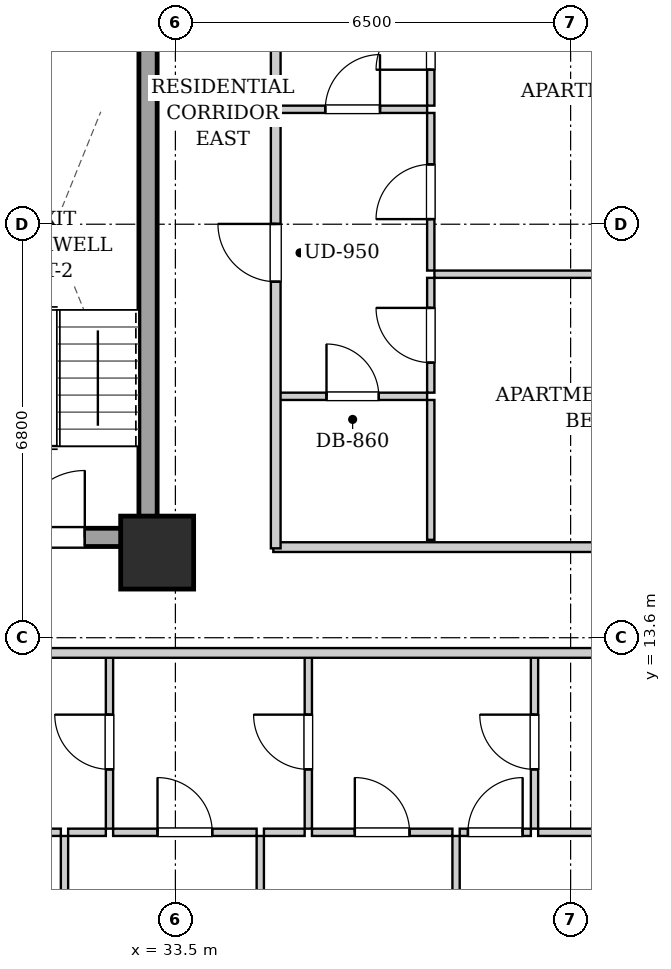
"""IFC4 building model, lengths in metres.
Left out: names, types, materials, properties, quantities, classifications, styles, units other than length and angle.
Written with IfcOpenShell. Run it as: python <this file> out.ifc"""

import sys

from ifc_helpers import new_model, si_unit, direction, frame, frame_2d, origin, origin_2d, place, context, subcontext, project, spatial, rectangle, extrude, element, fill, save


model = new_model("IFC4")
c1 = context("Model", 3, precision=1e-05, world=origin(), true_north=direction((0.0, 1.0)))
c2 = subcontext(c1, "Body", "Model", "MODEL_VIEW")
j1 = project(units=[si_unit("LENGTHUNIT", "METRE"), si_unit("PLANEANGLEUNIT", "RADIAN")], contexts=[c1])
p1 = place(None, origin())
s1 = spatial("IfcSite", under=j1, at=p1, CompositionType="ELEMENT")
p2 = place(p1, origin())
s2 = spatial("IfcBuilding", under=s1, at=p2, CompositionType="ELEMENT")
p3 = place(p2, frame((0.0, 0.0, 67.4)))
s3 = spatial("IfcBuildingStorey", under=s2, at=p3, CompositionType="ELEMENT", Elevation=67.4)
p4 = place(p3, frame((33.2, 15.0, 0.0), z_axis=(0.0, 0.0, 1.0), x_axis=(1.0, 0.0, 0.0)))
e1 = element("IfcColumn", 1, at=p4, inside=s3, PredefinedType="COLUMN", context=c2, shape_type="SweptSolid", body=[
    extrude(rectangle(XDim=1.2, YDim=1.2, at=origin_2d()), origin(), (0.0, 0.0, 1.0), 3.2),
])
p5 = place(p3, frame((33.05, 15.1, 0.0), z_axis=(0.0, 0.0, 1.0), x_axis=(0.0, 1.0, 0.0)))
e2 = element("IfcWall", 2, at=p5, inside=s3, PredefinedType="SHEAR", context=c2, shape_type="SweptSolid", body=[
    extrude(rectangle(XDim=9.0, YDim=0.3, at=frame_2d((4.5, 0.0))), origin(), (0.0, 0.0, 1.0), 2.88),
])
p6 = place(p3, frame((30.05, 15.25, 0.0), z_axis=(0.0, 0.0, 1.0), x_axis=(1.0, 0.0, 0.0)))
e3 = element("IfcWall", 3, at=p6, inside=s3, PredefinedType="SHEAR", context=c2, shape_type="SweptSolid", body=[
    extrude(rectangle(XDim=2.85, YDim=0.3, at=frame_2d((1.425, 0.0))), origin(), (0.0, 0.0, 1.0), 2.88),
])
p7 = place(p6, frame((0.86, 0.0, 0.0)))
e4 = element("IfcOpeningElement", 4, at=p7, cuts=e3, PredefinedType="OPENING", context=c2, shape_type="SweptSolid", body=[
    extrude(rectangle(XDim=1.1, YDim=2.05, at=frame_2d((0.55, 1.025))), frame((0.0, 0.16, 0.0), z_axis=(0.0, -1.0, 0.0), x_axis=(1.0, 0.0, 0.0)), (0.0, 0.0, 1.0), 0.32),
])
p8 = place(p3, frame((35.11, 15.09, 0.0), z_axis=(0.0, 0.0, 1.0), x_axis=(1.0, 0.0, 0.0)))
e5 = element("IfcWall", 5, at=p8, inside=s3, PredefinedType="PARTITIONING", context=c2, shape_type="SweptSolid", body=[
    extrude(rectangle(XDim=11.11, YDim=0.16, at=frame_2d((5.555, 0.0))), origin(), (0.0, 0.0, 1.0), 2.172),
])
p9 = place(p3, frame((32.416, 10.46, 0.0), z_axis=(0.0, 0.0, 1.0), x_axis=(0.0, 1.0, 0.0)))
e6 = element("IfcWall", 6, at=p9, inside=s3, PredefinedType="PARTITIONING", context=c2, shape_type="SweptSolid", body=[
    extrude(rectangle(XDim=2.85, YDim=0.12, at=frame_2d((1.425, 0.0))), origin(), (0.0, 0.0, 1.0), 2.88),
])
p10 = place(p9, frame((0.975, 0.0, 0.0)))
e7 = element("IfcOpeningElement", 7, at=p10, cuts=e6, PredefinedType="OPENING", context=c2, shape_type="SweptSolid", body=[
    extrude(rectangle(XDim=0.9, YDim=2.05, at=frame_2d((0.45, 1.025))), frame((0.0, 0.07, 0.0), z_axis=(0.0, -1.0, 0.0), x_axis=(1.0, 0.0, 0.0)), (0.0, 0.0, 1.0), 0.14),
])
p11 = place(p3, frame((29.206, 10.4, 0.0), z_axis=(0.0, 0.0, 1.0), x_axis=(1.0, 0.0, 0.0)))
e8 = element("IfcWall", 8, at=p11, inside=s3, PredefinedType="PARTITIONING", context=c2, shape_type="SweptSolid", body=[
    extrude(rectangle(XDim=2.41, YDim=0.12, at=frame_2d((1.205, 0.0))), origin(), (0.0, 0.0, 1.0), 2.88),
])
p12 = place(p11, frame((0.755, 0.0, 0.0)))
e9 = element("IfcOpeningElement", 9, at=p12, cuts=e8, PredefinedType="OPENING", context=c2, shape_type="SweptSolid", body=[
    extrude(rectangle(XDim=0.9, YDim=2.05, at=frame_2d((0.45, 1.025))), frame((0.0, 0.07, 0.0), z_axis=(0.0, -1.0, 0.0), x_axis=(1.0, 0.0, 0.0)), (0.0, 0.0, 1.0), 0.14),
])
p13 = place(p3, frame((31.736, 10.4, 0.0), z_axis=(0.0, 0.0, 1.0), x_axis=(1.0, 0.0, 0.0)))
e10 = element("IfcWall", 10, at=p13, inside=s3, PredefinedType="PARTITIONING", context=c2, shape_type="SweptSolid", body=[
    extrude(rectangle(XDim=0.62, YDim=0.12, at=frame_2d((0.31, 0.0))), origin(), (0.0, 0.0, 1.0), 2.88),
])
p14 = place(p3, frame((35.686, 10.46, 0.0), z_axis=(0.0, 0.0, 1.0), x_axis=(0.0, 1.0, 0.0)))
e11 = element("IfcWall", 11, at=p14, inside=s3, PredefinedType="PARTITIONING", context=c2, shape_type="SweptSolid", body=[
    extrude(rectangle(XDim=2.85, YDim=0.12, at=frame_2d((1.425, 0.0))), origin(), (0.0, 0.0, 1.0), 2.88),
])
p15 = place(p14, frame((0.975, 0.0, 0.0)))
e12 = element("IfcOpeningElement", 12, at=p15, cuts=e11, PredefinedType="OPENING", context=c2, shape_type="SweptSolid", body=[
    extrude(rectangle(XDim=0.9, YDim=2.05, at=frame_2d((0.45, 1.025))), frame((0.0, 0.07, 0.0), z_axis=(0.0, -1.0, 0.0), x_axis=(1.0, 0.0, 0.0)), (0.0, 0.0, 1.0), 0.14),
])
p16 = place(p3, frame((32.476, 10.4, 0.0), z_axis=(0.0, 0.0, 1.0), x_axis=(1.0, 0.0, 0.0)))
e13 = element("IfcWall", 13, at=p16, inside=s3, PredefinedType="PARTITIONING", context=c2, shape_type="SweptSolid", body=[
    extrude(rectangle(XDim=2.36, YDim=0.12, at=frame_2d((1.18, 0.0))), origin(), (0.0, 0.0, 1.0), 2.88),
])
p17 = place(p16, frame((0.73, 0.0, 0.0)))
e14 = element("IfcOpeningElement", 14, at=p17, cuts=e13, PredefinedType="OPENING", context=c2, shape_type="SweptSolid", body=[
    extrude(rectangle(XDim=0.9, YDim=2.05, at=frame_2d((0.45, 1.025))), frame((0.0, 0.07, 0.0), z_axis=(0.0, -1.0, 0.0), x_axis=(1.0, 0.0, 0.0)), (0.0, 0.0, 1.0), 0.14),
])
p18 = place(p3, frame((34.956, 10.4, 0.0), z_axis=(0.0, 0.0, 1.0), x_axis=(1.0, 0.0, 0.0)))
e15 = element("IfcWall", 15, at=p18, inside=s3, PredefinedType="PARTITIONING", context=c2, shape_type="SweptSolid", body=[
    extrude(rectangle(XDim=0.67, YDim=0.12, at=frame_2d((0.335, 0.0))), origin(), (0.0, 0.0, 1.0), 2.88),
])
p19 = place(p3, frame((39.406, 10.46, 0.0), z_axis=(0.0, 0.0, 1.0), x_axis=(0.0, 1.0, 0.0)))
e16 = element("IfcWall", 16, at=p19, inside=s3, PredefinedType="PARTITIONING", context=c2, shape_type="SweptSolid", body=[
    extrude(rectangle(XDim=2.85, YDim=0.12, at=frame_2d((1.425, 0.0))), origin(), (0.0, 0.0, 1.0), 2.88),
])
p20 = place(p19, frame((0.975, 0.0, 0.0)))
e17 = element("IfcOpeningElement", 17, at=p20, cuts=e16, PredefinedType="OPENING", context=c2, shape_type="SweptSolid", body=[
    extrude(rectangle(XDim=0.9, YDim=2.05, at=frame_2d((0.45, 1.025))), frame((0.0, 0.07, 0.0), z_axis=(0.0, -1.0, 0.0), x_axis=(1.0, 0.0, 0.0)), (0.0, 0.0, 1.0), 0.14),
])
p21 = place(p3, frame((35.746, 10.4, 0.0), z_axis=(0.0, 0.0, 1.0), x_axis=(1.0, 0.0, 0.0)))
e18 = element("IfcWall", 18, at=p21, inside=s3, PredefinedType="PARTITIONING", context=c2, shape_type="SweptSolid", body=[
    extrude(rectangle(XDim=2.31, YDim=0.12, at=frame_2d((1.155, 0.0))), origin(), (0.0, 0.0, 1.0), 2.88),
])
p22 = place(p21, frame((0.705, 0.0, 0.0)))
e19 = element("IfcOpeningElement", 19, at=p22, cuts=e18, PredefinedType="OPENING", context=c2, shape_type="SweptSolid", body=[
    extrude(rectangle(XDim=0.9, YDim=2.05, at=frame_2d((0.45, 1.025))), frame((0.0, 0.07, 0.0), z_axis=(0.0, -1.0, 0.0), x_axis=(1.0, 0.0, 0.0)), (0.0, 0.0, 1.0), 0.14),
])
p23 = place(p3, frame((38.176, 10.4, 0.0), z_axis=(0.0, 0.0, 1.0), x_axis=(1.0, 0.0, 0.0)))
e20 = element("IfcWall", 20, at=p23, inside=s3, PredefinedType="PARTITIONING", context=c2, shape_type="SweptSolid", body=[
    extrude(rectangle(XDim=1.17, YDim=0.12, at=frame_2d((0.585, 0.0))), origin(), (0.0, 0.0, 1.0), 2.88),
])
p24 = place(p23, frame((0.135, 0.0, 0.0)))
e21 = element("IfcOpeningElement", 21, at=p24, cuts=e20, PredefinedType="OPENING", context=c2, shape_type="SweptSolid", body=[
    extrude(rectangle(XDim=0.9, YDim=2.05, at=frame_2d((0.45, 1.025))), frame((0.0, 0.07, 0.0), z_axis=(0.0, -1.0, 0.0), x_axis=(1.0, 0.0, 0.0)), (0.0, 0.0, 1.0), 0.14),
])
p25 = place(p3, frame((39.466, 10.4, 0.0), z_axis=(0.0, 0.0, 1.0), x_axis=(1.0, 0.0, 0.0)))
e22 = element("IfcWall", 22, at=p25, inside=s3, PredefinedType="PARTITIONING", context=c2, shape_type="SweptSolid", body=[
    extrude(rectangle(XDim=4.024, YDim=0.12, at=frame_2d((2.012, 0.0))), origin(), (0.0, 0.0, 1.0), 2.88),
])
p26 = place(p25, frame((1.562, 0.0, 0.0)))
e23 = element("IfcOpeningElement", 23, at=p26, cuts=e22, PredefinedType="OPENING", context=c2, shape_type="SweptSolid", body=[
    extrude(rectangle(XDim=0.9, YDim=2.05, at=frame_2d((0.45, 1.025))), frame((0.0, 0.07, 0.0), z_axis=(0.0, -1.0, 0.0), x_axis=(1.0, 0.0, 0.0)), (0.0, 0.0, 1.0), 0.14),
])
p27 = place(p3, frame((31.676, 0.28, 0.0), z_axis=(0.0, 0.0, 1.0), x_axis=(0.0, 1.0, 0.0)))
e24 = element("IfcWall", 24, at=p27, inside=s3, PredefinedType="PARTITIONING", context=c2, shape_type="SweptSolid", body=[
    extrude(rectangle(XDim=10.06, YDim=0.12, at=frame_2d((5.03, 0.0))), origin(), (0.0, 0.0, 1.0), 2.88),
])
p28 = place(p27, frame((4.565, 0.0, 0.0)))
e25 = element("IfcOpeningElement", 25, at=p28, cuts=e24, PredefinedType="OPENING", context=c2, shape_type="SweptSolid", body=[
    extrude(rectangle(XDim=0.9, YDim=2.05, at=frame_2d((0.45, 1.025))), frame((0.0, 0.07, 0.0), z_axis=(0.0, -1.0, 0.0), x_axis=(1.0, 0.0, 0.0)), (0.0, 0.0, 1.0), 0.14),
])
p29 = place(p3, frame((34.896, 0.28, 0.0), z_axis=(0.0, 0.0, 1.0), x_axis=(0.0, 1.0, 0.0)))
e26 = element("IfcWall", 26, at=p29, inside=s3, PredefinedType="PARTITIONING", context=c2, shape_type="SweptSolid", body=[
    extrude(rectangle(XDim=10.06, YDim=0.12, at=frame_2d((5.03, 0.0))), origin(), (0.0, 0.0, 1.0), 2.88),
])
p30 = place(p29, frame((4.565, 0.0, 0.0)))
e27 = element("IfcOpeningElement", 27, at=p30, cuts=e26, PredefinedType="OPENING", context=c2, shape_type="SweptSolid", body=[
    extrude(rectangle(XDim=0.9, YDim=2.05, at=frame_2d((0.45, 1.025))), frame((0.0, 0.07, 0.0), z_axis=(0.0, -1.0, 0.0), x_axis=(1.0, 0.0, 0.0)), (0.0, 0.0, 1.0), 0.14),
])
p31 = place(p3, frame((38.116, 0.28, 0.0), z_axis=(0.0, 0.0, 1.0), x_axis=(0.0, 1.0, 0.0)))
e28 = element("IfcWall", 28, at=p31, inside=s3, PredefinedType="PARTITIONING", context=c2, shape_type="SweptSolid", body=[
    extrude(rectangle(XDim=10.06, YDim=0.12, at=frame_2d((5.03, 0.0))), origin(), (0.0, 0.0, 1.0), 2.88),
])
p32 = place(p31, frame((4.565, 0.0, 0.0)))
e29 = element("IfcOpeningElement", 29, at=p32, cuts=e28, PredefinedType="OPENING", context=c2, shape_type="SweptSolid", body=[
    extrude(rectangle(XDim=0.9, YDim=2.05, at=frame_2d((0.45, 1.025))), frame((0.0, 0.07, 0.0), z_axis=(0.0, -1.0, 0.0), x_axis=(1.0, 0.0, 0.0)), (0.0, 0.0, 1.0), 0.14),
])
p33 = place(p3, frame((35.19, 22.29, 0.0), z_axis=(0.0, 0.0, 1.0), x_axis=(1.0, 0.0, 0.0)))
e30 = element("IfcWall", 30, at=p33, inside=s3, PredefinedType="PARTITIONING", context=c2, shape_type="SweptSolid", body=[
    extrude(rectangle(XDim=2.45, YDim=0.12, at=frame_2d((1.225, 0.0))), origin(), (0.0, 0.0, 1.0), 2.88),
])
p34 = place(p33, frame((0.775, 0.0, 0.0)))
e31 = element("IfcOpeningElement", 31, at=p34, cuts=e30, PredefinedType="OPENING", context=c2, shape_type="SweptSolid", body=[
    extrude(rectangle(XDim=0.9, YDim=2.05, at=frame_2d((0.45, 1.025))), frame((0.0, 0.07, 0.0), z_axis=(0.0, -1.0, 0.0), x_axis=(1.0, 0.0, 0.0)), (0.0, 0.0, 1.0), 0.14),
])
p35 = place(p3, frame((37.7, 22.35, 0.0), z_axis=(0.0, 0.0, 1.0), x_axis=(0.0, 1.0, 0.0)))
e32 = element("IfcWall", 32, at=p35, inside=s3, PredefinedType="PARTITIONING", context=c2, shape_type="SweptSolid", body=[
    extrude(rectangle(XDim=2.082, YDim=0.12, at=frame_2d((1.041, 0.0))), origin(), (0.0, 0.0, 1.0), 2.88),
])
p36 = place(p35, frame((0.591, 0.0, 0.0)))
e33 = element("IfcOpeningElement", 33, at=p36, cuts=e32, PredefinedType="OPENING", context=c2, shape_type="SweptSolid", body=[
    extrude(rectangle(XDim=0.9, YDim=2.05, at=frame_2d((0.45, 1.025))), frame((0.0, 0.07, 0.0), z_axis=(0.0, -1.0, 0.0), x_axis=(1.0, 0.0, 0.0)), (0.0, 0.0, 1.0), 0.14),
])
p37 = place(p3, frame((35.19, 17.57, 0.0), z_axis=(0.0, 0.0, 1.0), x_axis=(1.0, 0.0, 0.0)))
e34 = element("IfcWall", 34, at=p37, inside=s3, PredefinedType="PARTITIONING", context=c2, shape_type="SweptSolid", body=[
    extrude(rectangle(XDim=2.45, YDim=0.12, at=frame_2d((1.225, 0.0))), origin(), (0.0, 0.0, 1.0), 2.88),
])
p38 = place(p37, frame((0.795, 0.0, 0.0)))
e35 = element("IfcOpeningElement", 35, at=p38, cuts=e34, PredefinedType="OPENING", context=c2, shape_type="SweptSolid", body=[
    extrude(rectangle(XDim=0.86, YDim=2.05, at=frame_2d((0.43, 1.025))), frame((0.0, 0.07, 0.0), z_axis=(0.0, -1.0, 0.0), x_axis=(1.0, 0.0, 0.0)), (0.0, 0.0, 1.0), 0.14),
])
p39 = place(p3, frame((37.7, 15.21, 0.0), z_axis=(0.0, 0.0, 1.0), x_axis=(0.0, 1.0, 0.0)))
e36 = element("IfcWall", 36, at=p39, inside=s3, PredefinedType="PARTITIONING", context=c2, shape_type="SweptSolid", body=[
    extrude(rectangle(XDim=2.3, YDim=0.12, at=frame_2d((1.15, 0.0))), origin(), (0.0, 0.0, 1.0), 2.88),
])
p40 = place(p3, frame((37.7, 17.63, 0.0), z_axis=(0.0, 0.0, 1.0), x_axis=(0.0, 1.0, 0.0)))
e37 = element("IfcWall", 37, at=p40, inside=s3, PredefinedType="PARTITIONING", context=c2, shape_type="SweptSolid", body=[
    extrude(rectangle(XDim=1.888, YDim=0.12, at=frame_2d((0.944, 0.0))), origin(), (0.0, 0.0, 1.0), 2.88),
])
p41 = place(p40, frame((0.494, 0.0, 0.0)))
e38 = element("IfcOpeningElement", 38, at=p41, cuts=e37, PredefinedType="OPENING", context=c2, shape_type="SweptSolid", body=[
    extrude(rectangle(XDim=0.9, YDim=2.05, at=frame_2d((0.45, 1.025))), frame((0.0, 0.07, 0.0), z_axis=(0.0, -1.0, 0.0), x_axis=(1.0, 0.0, 0.0)), (0.0, 0.0, 1.0), 0.14),
])
p42 = place(p3, frame((37.7, 19.638, 0.0), z_axis=(0.0, 0.0, 1.0), x_axis=(0.0, 1.0, 0.0)))
e39 = element("IfcWall", 39, at=p42, inside=s3, PredefinedType="PARTITIONING", context=c2, shape_type="SweptSolid", body=[
    extrude(rectangle(XDim=2.592, YDim=0.12, at=frame_2d((1.296, 0.0))), origin(), (0.0, 0.0, 1.0), 2.88),
])
p43 = place(p42, frame((0.846, 0.0, 0.0)))
e40 = element("IfcOpeningElement", 40, at=p43, cuts=e39, PredefinedType="OPENING", context=c2, shape_type="SweptSolid", body=[
    extrude(rectangle(XDim=0.9, YDim=2.05, at=frame_2d((0.45, 1.025))), frame((0.0, 0.07, 0.0), z_axis=(0.0, -1.0, 0.0), x_axis=(1.0, 0.0, 0.0)), (0.0, 0.0, 1.0), 0.14),
])
p44 = place(p3, frame((37.76, 19.578, 0.0), z_axis=(0.0, 0.0, 1.0), x_axis=(1.0, 0.0, 0.0)))
e41 = element("IfcWall", 41, at=p44, inside=s3, PredefinedType="PARTITIONING", context=c2, shape_type="SweptSolid", body=[
    extrude(rectangle(XDim=6.31, YDim=0.12, at=frame_2d((3.155, 0.0))), origin(), (0.0, 0.0, 1.0), 2.88),
])
p45 = place(p44, frame((2.705, 0.0, 0.0)))
e42 = element("IfcOpeningElement", 42, at=p45, cuts=e41, PredefinedType="OPENING", context=c2, shape_type="SweptSolid", body=[
    extrude(rectangle(XDim=0.9, YDim=2.05, at=frame_2d((0.45, 1.025))), frame((0.0, 0.07, 0.0), z_axis=(0.0, -1.0, 0.0), x_axis=(1.0, 0.0, 0.0)), (0.0, 0.0, 1.0), 0.14),
])
p46 = place(p3, frame((10.05, 13.35, 0.0), z_axis=(0.0, 0.0, 1.0), x_axis=(1.0, 0.0, 0.0)))
e43 = element("IfcWall", 43, at=p46, inside=s3, PredefinedType="PARTITIONING", context=c2, shape_type="SweptSolid", body=[
    extrude(rectangle(XDim=33.9, YDim=0.16, at=frame_2d((16.95, 0.0))), origin(), (0.0, 0.0, 1.0), 2.88),
])
p47 = place(p46, frame((3.8, 0.0, 0.0)))
e44 = element("IfcOpeningElement", 44, at=p47, cuts=e43, PredefinedType="OPENING", context=c2, shape_type="SweptSolid", body=[
    extrude(rectangle(XDim=0.95, YDim=2.1, at=frame_2d((0.475, 1.05))), frame((0.0, 0.09, 0.0), z_axis=(0.0, -1.0, 0.0), x_axis=(1.0, 0.0, 0.0)), (0.0, 0.0, 1.0), 0.18),
])
p48 = place(p46, frame((13.071, 0.0, 0.0)))
e45 = element("IfcOpeningElement", 45, at=p48, cuts=e43, PredefinedType="OPENING", context=c2, shape_type="SweptSolid", body=[
    extrude(rectangle(XDim=0.95, YDim=2.1, at=frame_2d((0.475, 1.05))), frame((0.0, 0.09, 0.0), z_axis=(0.0, -1.0, 0.0), x_axis=(1.0, 0.0, 0.0)), (0.0, 0.0, 1.0), 0.18),
])
p49 = place(p3, frame((35.15, 15.07, 0.0), z_axis=(0.0, 0.0, 1.0), x_axis=(0.0, 1.0, 0.0)))
e46 = element("IfcWall", 46, at=p49, inside=s3, PredefinedType="PARTITIONING", context=c2, shape_type="SweptSolid", body=[
    extrude(rectangle(XDim=13.93, YDim=0.16, at=frame_2d((6.965, 0.0))), origin(), (0.0, 0.0, 1.0), 2.88),
])
p50 = place(p49, frame((4.385, 0.0, 0.0)))
e47 = element("IfcOpeningElement", 47, at=p50, cuts=e46, PredefinedType="OPENING", context=c2, shape_type="SweptSolid", body=[
    extrude(rectangle(XDim=0.95, YDim=2.1, at=frame_2d((0.475, 1.05))), frame((0.0, 0.09, 0.0), z_axis=(0.0, -1.0, 0.0), x_axis=(1.0, 0.0, 0.0)), (0.0, 0.0, 1.0), 0.18),
])
p51 = place(p7, origin())
e48 = element("IfcDoor", 48, at=p51, inside=s3, OperationType="SINGLE_SWING_RIGHT", PredefinedType="DOOR", context=c2, shape_type="SweptSolid", body=[
    extrude(rectangle(XDim=1.1, YDim=2.05, at=frame_2d((0.55, 1.025))), frame((0.0, 0.025, 0.0), z_axis=(0.0, -1.0, 0.0), x_axis=(1.0, 0.0, 0.0)), (0.0, 0.0, 1.0), 0.05),
])
fill(e4, e48)
p52 = place(p10, origin())
e49 = element("IfcDoor", 49, at=p52, inside=s3, OperationType="SINGLE_SWING_RIGHT", PredefinedType="DOOR", context=c2, shape_type="SweptSolid", body=[
    extrude(rectangle(XDim=0.9, YDim=2.05, at=frame_2d((0.45, 1.025))), frame((0.0, 0.025, 0.0), z_axis=(0.0, -1.0, 0.0), x_axis=(1.0, 0.0, 0.0)), (0.0, 0.0, 1.0), 0.05),
])
fill(e7, e49)
p53 = place(p15, origin())
e50 = element("IfcDoor", 50, at=p53, inside=s3, OperationType="SINGLE_SWING_RIGHT", PredefinedType="DOOR", context=c2, shape_type="SweptSolid", body=[
    extrude(rectangle(XDim=0.9, YDim=2.05, at=frame_2d((0.45, 1.025))), frame((0.0, 0.025, 0.0), z_axis=(0.0, -1.0, 0.0), x_axis=(1.0, 0.0, 0.0)), (0.0, 0.0, 1.0), 0.05),
])
fill(e12, e50)
p54 = place(p17, origin())
e51 = element("IfcDoor", 51, at=p54, inside=s3, OperationType="SINGLE_SWING_LEFT", PredefinedType="DOOR", context=c2, shape_type="SweptSolid", body=[
    extrude(rectangle(XDim=0.9, YDim=2.05, at=frame_2d((0.45, 1.025))), frame((0.0, 0.025, 0.0), z_axis=(0.0, -1.0, 0.0), x_axis=(1.0, 0.0, 0.0)), (0.0, 0.0, 1.0), 0.05),
])
fill(e14, e51)
p55 = place(p20, origin())
e52 = element("IfcDoor", 52, at=p55, inside=s3, OperationType="SINGLE_SWING_RIGHT", PredefinedType="DOOR", context=c2, shape_type="SweptSolid", body=[
    extrude(rectangle(XDim=0.9, YDim=2.05, at=frame_2d((0.45, 1.025))), frame((0.0, 0.025, 0.0), z_axis=(0.0, -1.0, 0.0), x_axis=(1.0, 0.0, 0.0)), (0.0, 0.0, 1.0), 0.05),
])
fill(e17, e52)
p56 = place(p22, origin())
e53 = element("IfcDoor", 53, at=p56, inside=s3, OperationType="SINGLE_SWING_LEFT", PredefinedType="DOOR", context=c2, shape_type="SweptSolid", body=[
    extrude(rectangle(XDim=0.9, YDim=2.05, at=frame_2d((0.45, 1.025))), frame((0.0, 0.025, 0.0), z_axis=(0.0, -1.0, 0.0), x_axis=(1.0, 0.0, 0.0)), (0.0, 0.0, 1.0), 0.05),
])
fill(e19, e53)
p57 = place(p24, origin())
e54 = element("IfcDoor", 54, at=p57, inside=s3, OperationType="SINGLE_SWING_RIGHT", PredefinedType="DOOR", context=c2, shape_type="SweptSolid", body=[
    extrude(rectangle(XDim=0.9, YDim=2.05, at=frame_2d((0.45, 1.025))), frame((0.0, 0.025, 0.0), z_axis=(0.0, -1.0, 0.0), x_axis=(1.0, 0.0, 0.0)), (0.0, 0.0, 1.0), 0.05),
])
fill(e21, e54)
p58 = place(p34, origin())
e55 = element("IfcDoor", 55, at=p58, inside=s3, OperationType="SINGLE_SWING_RIGHT", PredefinedType="DOOR", context=c2, shape_type="SweptSolid", body=[
    extrude(rectangle(XDim=0.9, YDim=2.05, at=frame_2d((0.45, 1.025))), frame((0.0, 0.025, 0.0), z_axis=(0.0, -1.0, 0.0), x_axis=(1.0, 0.0, 0.0)), (0.0, 0.0, 1.0), 0.05),
])
fill(e31, e55)
p59 = place(p36, origin())
e56 = element("IfcDoor", 56, at=p59, inside=s3, OperationType="SINGLE_SWING_LEFT", PredefinedType="DOOR", context=c2, shape_type="SweptSolid", body=[
    extrude(rectangle(XDim=0.9, YDim=2.05, at=frame_2d((0.45, 1.025))), frame((0.0, 0.025, 0.0), z_axis=(0.0, -1.0, 0.0), x_axis=(1.0, 0.0, 0.0)), (0.0, 0.0, 1.0), 0.05),
])
fill(e33, e56)
p60 = place(p38, origin())
e57 = element("IfcDoor", 57, at=p60, inside=s3, OperationType="SINGLE_SWING_LEFT", PredefinedType="DOOR", context=c2, shape_type="SweptSolid", body=[
    extrude(rectangle(XDim=0.86, YDim=2.05, at=frame_2d((0.43, 1.025))), frame((0.0, 0.025, 0.0), z_axis=(0.0, -1.0, 0.0), x_axis=(1.0, 0.0, 0.0)), (0.0, 0.0, 1.0), 0.05),
])
fill(e35, e57)
p61 = place(p41, origin())
e58 = element("IfcDoor", 58, at=p61, inside=s3, OperationType="SINGLE_SWING_RIGHT", PredefinedType="DOOR", context=c2, shape_type="SweptSolid", body=[
    extrude(rectangle(XDim=0.9, YDim=2.05, at=frame_2d((0.45, 1.025))), frame((0.0, 0.025, 0.0), z_axis=(0.0, -1.0, 0.0), x_axis=(1.0, 0.0, 0.0)), (0.0, 0.0, 1.0), 0.05),
])
fill(e38, e58)
p62 = place(p43, origin())
e59 = element("IfcDoor", 59, at=p62, inside=s3, OperationType="SINGLE_SWING_LEFT", PredefinedType="DOOR", context=c2, shape_type="SweptSolid", body=[
    extrude(rectangle(XDim=0.9, YDim=2.05, at=frame_2d((0.45, 1.025))), frame((0.0, 0.025, 0.0), z_axis=(0.0, -1.0, 0.0), x_axis=(1.0, 0.0, 0.0)), (0.0, 0.0, 1.0), 0.05),
])
fill(e40, e59)
p63 = place(p50, origin())
e60 = element("IfcDoor", 60, at=p63, inside=s3, OperationType="SINGLE_SWING_RIGHT", PredefinedType="DOOR", context=c2, shape_type="SweptSolid", body=[
    extrude(rectangle(XDim=0.95, YDim=2.1, at=frame_2d((0.475, 1.05))), frame((0.0, 0.025, 0.0), z_axis=(0.0, -1.0, 0.0), x_axis=(1.0, 0.0, 0.0)), (0.0, 0.0, 1.0), 0.05),
])
fill(e47, e60)
save(model, sys.argv[1])
